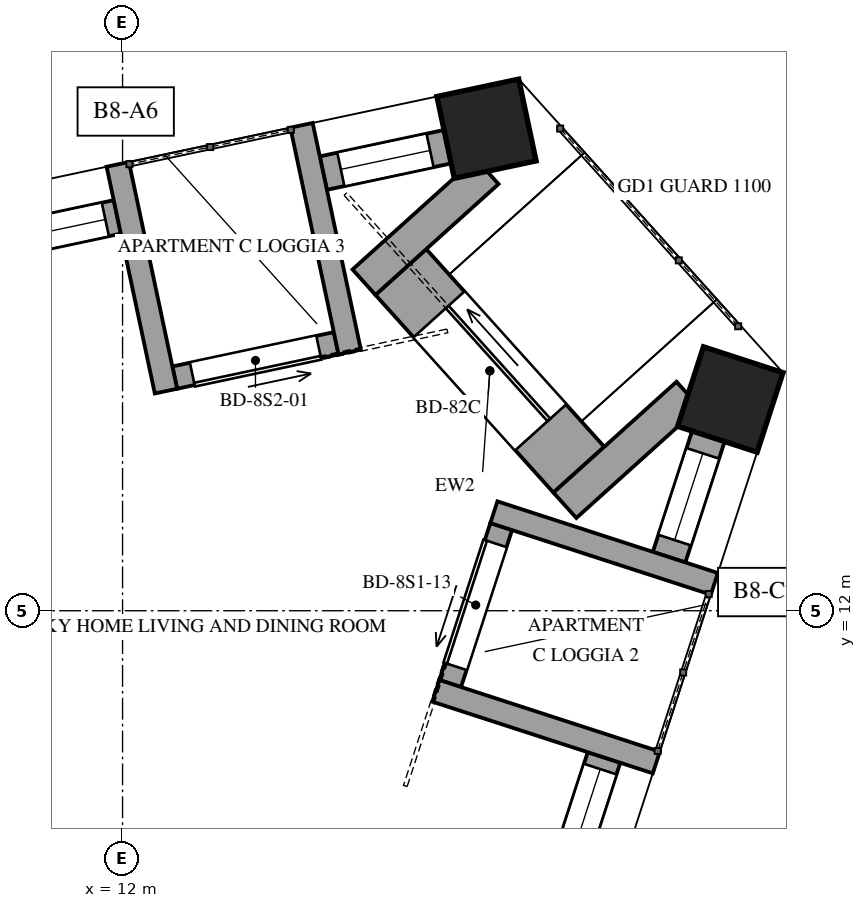
"""IFC4 building model, lengths in metres.
Left out: names, types, materials, properties, quantities, classifications, styles, units other than length and angle.
Written with IfcOpenShell. Run it as: python <this file> out.ifc"""

import sys

from ifc_helpers import new_model, si_unit, direction, frame, frame_2d, origin, origin_2d, place, context, subcontext, project, spatial, rectangle, extrude, element, fill, save


model = new_model("IFC4")
c1 = context("Model", 3, precision=1e-05, world=origin(), true_north=direction((0.0, 1.0)))
c2 = subcontext(c1, "Body", "Model", "MODEL_VIEW")
j1 = project(units=[si_unit("LENGTHUNIT", "METRE"), si_unit("PLANEANGLEUNIT", "RADIAN")], contexts=[c1])
p1 = place(None, origin())
s1 = spatial("IfcSite", under=j1, at=p1, CompositionType="ELEMENT")
p2 = place(p1, origin())
s2 = spatial("IfcBuilding", under=s1, at=p2, CompositionType="ELEMENT")
p3 = place(p2, frame((0.0, 0.0, 320.4)))
s3 = spatial("IfcBuildingStorey", under=s2, at=p3, CompositionType="ELEMENT", Elevation=320.4)
for number, where, z_axis, x_axis in (
    (1, (19.996, 14.779, -0.35), (0.0, 0.0, 1.0), (0.309, 0.951, 0.0)),
    (2, (16.788, 18.341, -0.35), (0.0, 0.0, 1.0), (-0.978, -0.208, 0.0)),
):
    element("IfcColumn", number, at=place(p3, frame(where, z_axis=z_axis, x_axis=x_axis)), inside=s3, PredefinedType="COLUMN", context=c2, shape_type="SweptSolid", body=[
        extrude(rectangle(XDim=1.1, YDim=1.1, at=origin_2d()), origin(), (0.0, 0.0, 1.0), 4.35),
    ])
p4 = place(p3, frame((17.632, 7.909, 0.0), z_axis=(0.0, 0.0, 1.0), x_axis=(0.309027740273, 0.951053024674, 0.0)))
e3 = element("IfcWall", 3, at=p4, inside=s3, PredefinedType="SOLIDWALL", context=c2, shape_type="SweptSolid", body=[
    extrude(rectangle(XDim=2.271, YDim=0.45, at=frame_2d((1.136, 0.0))), origin(), (0.0, 0.0, 1.0), 3.3),
])
p5 = place(p4, frame((0.161, 0.0, 0.4)))
e4 = element("IfcOpeningElement", 4, at=p5, cuts=e3, PredefinedType="OPENING", context=c2, shape_type="SweptSolid", body=[
    extrude(rectangle(XDim=1.95, YDim=2.75, at=frame_2d((0.975, 1.375))), frame((0.0, 0.235, 0.0), z_axis=(0.0, -1.0, 0.0), x_axis=(1.0, 0.0, 0.0)), (0.0, 0.0, 1.0), 0.47),
])
p6 = place(p3, frame((19.19, 12.705, 0.0), z_axis=(0.0, 0.0, 1.0), x_axis=(0.30898696848, 0.951066271776, 0.0)))
e5 = element("IfcWall", 5, at=p6, inside=s3, PredefinedType="SOLIDWALL", context=c2, shape_type="SweptSolid", body=[
    extrude(rectangle(XDim=1.671, YDim=0.45, at=frame_2d((0.835, 0.0))), origin(), (0.0, 0.0, 1.0), 3.3),
])
p7 = place(p6, frame((0.236, 0.0, 0.4)))
e6 = element("IfcOpeningElement", 6, at=p7, cuts=e5, PredefinedType="OPENING", context=c2, shape_type="SweptSolid", body=[
    extrude(rectangle(XDim=1.2, YDim=2.1, at=frame_2d((0.6, 1.05))), frame((0.0, 0.235, 0.0), z_axis=(0.0, -1.0, 0.0), x_axis=(1.0, 0.0, 0.0)), (0.0, 0.0, 1.0), 0.47),
])
p8 = place(p3, frame((16.276, 18.105, 0.0), z_axis=(0.0, 0.0, 1.0), x_axis=(-0.978126168783, -0.208012494676, 0.0)))
e7 = element("IfcWall", 7, at=p8, inside=s3, PredefinedType="SOLIDWALL", context=c2, shape_type="SweptSolid", body=[
    extrude(rectangle(XDim=1.671, YDim=0.45, at=frame_2d((0.836, 0.0))), origin(), (0.0, 0.0, 1.0), 3.3),
])
p9 = place(p8, frame((0.236, 0.0, 0.4)))
e8 = element("IfcOpeningElement", 8, at=p9, cuts=e7, PredefinedType="OPENING", context=c2, shape_type="SweptSolid", body=[
    extrude(rectangle(XDim=1.2, YDim=2.1, at=frame_2d((0.6, 1.05))), frame((0.0, 0.235, 0.0), z_axis=(0.0, -1.0, 0.0), x_axis=(1.0, 0.0, 0.0)), (0.0, 0.0, 1.0), 0.47),
])
p10 = place(p3, frame((11.931, 17.181, 0.0), z_axis=(0.0, 0.0, 1.0), x_axis=(-0.978153386925, -0.207884467067, 0.0)))
e9 = element("IfcWall", 9, at=p10, inside=s3, PredefinedType="SOLIDWALL", context=c2, shape_type="SweptSolid", body=[
    extrude(rectangle(XDim=2.271, YDim=0.45, at=frame_2d((1.136, 0.0))), origin(), (0.0, 0.0, 1.0), 3.3),
])
p11 = place(p10, frame((0.161, 0.0, 0.4)))
e10 = element("IfcOpeningElement", 10, at=p11, cuts=e9, PredefinedType="OPENING", context=c2, shape_type="SweptSolid", body=[
    extrude(rectangle(XDim=1.95, YDim=2.75, at=frame_2d((0.975, 1.375))), frame((0.0, 0.235, 0.0), z_axis=(0.0, -1.0, 0.0), x_axis=(1.0, 0.0, 0.0)), (0.0, 0.0, 1.0), 0.47),
])
p12 = place(p3, frame((16.311, 11.042, 0.0), z_axis=(0.0, 0.0, 1.0), x_axis=(0.308999623589, 0.95106216023, 0.0)))
e11 = element("IfcWall", 11, at=p12, inside=s3, PredefinedType="SOLIDWALL", context=c2, shape_type="SweptSolid", body=[
    extrude(rectangle(XDim=2.171, YDim=0.3, at=frame_2d((1.085, 0.0))), origin(), (0.0, 0.0, 1.0), 3.3),
])
p13 = place(p12, frame((0.236, 0.0, 0.0)))
e12 = element("IfcOpeningElement", 12, at=p13, cuts=e11, PredefinedType="OPENING", context=c2, shape_type="SweptSolid", body=[
    extrude(rectangle(XDim=1.7, YDim=2.5, at=frame_2d((0.85, 1.25))), frame((0.0, 0.16, 0.0), z_axis=(0.0, -1.0, 0.0), x_axis=(1.0, 0.0, 0.0)), (0.0, 0.0, 1.0), 0.32),
])
for number, where, z_axis, x_axis in (
    (13, (19.022, 10.003, 0.0), (0.0, 0.0, 1.0), (-0.951, 0.309, 0.0)),
    (14, (19.786, 12.354, 0.0), (0.0, 0.0, 1.0), (-0.951, 0.309, 0.0)),
):
    element("IfcWall", number, at=place(p3, frame(where, z_axis=z_axis, x_axis=x_axis)), inside=s3, PredefinedType="SOLIDWALL", context=c2, shape_type="SweptSolid", body=[
        extrude(rectangle(XDim=3.05, YDim=0.3, at=frame_2d((1.525, 0.0))), origin(), (0.0, 0.0, 1.0), 3.3),
    ])
p14 = place(p3, frame((14.811, 15.518, 0.0), z_axis=(0.0, 0.0, 1.0), x_axis=(-0.978148276005, -0.207908513891, 0.0)))
e15 = element("IfcWall", 15, at=p14, inside=s3, PredefinedType="SOLIDWALL", context=c2, shape_type="SweptSolid", body=[
    extrude(rectangle(XDim=2.171, YDim=0.3, at=frame_2d((1.085, 0.0))), origin(), (0.0, 0.0, 1.0), 3.3),
])
p15 = place(p14, frame((0.236, 0.0, 0.0)))
e16 = element("IfcOpeningElement", 16, at=p15, cuts=e15, PredefinedType="OPENING", context=c2, shape_type="SweptSolid", body=[
    extrude(rectangle(XDim=1.7, YDim=2.5, at=frame_2d((0.85, 1.25))), frame((0.0, 0.16, 0.0), z_axis=(0.0, -1.0, 0.0), x_axis=(1.0, 0.0, 0.0)), (0.0, 0.0, 1.0), 0.32),
])
p16 = place(p3, frame((14.354, 18.386, 0.0), z_axis=(0.0, 0.0, 1.0), x_axis=(0.207954487003, -0.978138503145, 0.0)))
e17 = element("IfcWall", 17, at=p16, inside=s3, PredefinedType="SOLIDWALL", context=c2, shape_type="SweptSolid", body=[
    extrude(rectangle(XDim=3.05, YDim=0.3, at=frame_2d((1.525, 0.0))), origin(), (0.0, 0.0, 1.0), 3.3),
])
p17 = place(p3, frame((11.937, 17.872, 0.0), z_axis=(0.0, 0.0, 1.0), x_axis=(0.207894179953, -0.978151322619, 0.0)))
e18 = element("IfcWall", 18, at=p17, inside=s3, PredefinedType="SOLIDWALL", context=c2, shape_type="SweptSolid", body=[
    extrude(rectangle(XDim=3.05, YDim=0.3, at=frame_2d((1.525, 0.0))), origin(), (0.0, 0.0, 1.0), 3.3),
])
p18 = place(p3, frame((15.661, 16.456, 0.0), z_axis=(0.0, 0.0, 1.0), x_axis=(0.669134277936, -0.743141519559, 0.0)))
e19 = element("IfcWall", 19, at=p18, inside=s3, PredefinedType="SOLIDWALL", context=c2, shape_type="SweptSolid", body=[
    extrude(rectangle(XDim=3.5, YDim=0.9, at=frame_2d((1.75, 0.0))), origin(), (0.0, 0.0, 1.0), 3.3),
])
p19 = place(p18, frame((0.75, 0.0, 0.0)))
e20 = element("IfcOpeningElement", 20, at=p19, cuts=e19, PredefinedType="OPENING", context=c2, shape_type="SweptSolid", body=[
    extrude(rectangle(XDim=2.0, YDim=2.4, at=frame_2d((1.0, 1.2))), frame((0.0, 0.46, 0.0), z_axis=(0.0, -1.0, 0.0), x_axis=(1.0, 0.0, 0.0)), (0.0, 0.0, 1.0), 0.92),
])
p20 = place(p3, frame((16.796, 17.781, 0.0), z_axis=(0.0, 0.0, 1.0), x_axis=(-0.743165997662, -0.669107091518, 0.0)))
e21 = element("IfcWall", 21, at=p20, inside=s3, PredefinedType="SOLIDWALL", context=c2, shape_type="SweptSolid", body=[
    extrude(rectangle(XDim=2.179, YDim=0.45, at=frame_2d((1.089, 0.0))), origin(), (0.0, 0.0, 1.0), 2.55),
])
p21 = place(p3, frame((19.439, 14.845, 0.0), z_axis=(0.0, 0.0, 1.0), x_axis=(-0.743110286166, -0.669168964159, 0.0)))
e22 = element("IfcWall", 22, at=p21, inside=s3, PredefinedType="SOLIDWALL", context=c2, shape_type="SweptSolid", body=[
    extrude(rectangle(XDim=2.179, YDim=0.45, at=frame_2d((1.09, 0.0))), origin(), (0.0, 0.0, 1.0), 2.55),
])
p22 = place(p5, origin())
e23 = element("IfcWindow", 23, at=p22, inside=s3, PartitioningType="SINGLE_PANEL", PredefinedType="WINDOW", context=c2, shape_type="SweptSolid", body=[
    extrude(rectangle(XDim=1.95, YDim=2.75, at=frame_2d((0.975, 1.375))), frame((0.0, 0.03, 0.0), z_axis=(0.0, -1.0, 0.0), x_axis=(1.0, 0.0, 0.0)), (0.0, 0.0, 1.0), 0.06),
])
fill(e4, e23)
p23 = place(p7, origin())
e24 = element("IfcWindow", 24, at=p23, inside=s3, PartitioningType="SINGLE_PANEL", PredefinedType="WINDOW", context=c2, shape_type="SweptSolid", body=[
    extrude(rectangle(XDim=1.2, YDim=2.1, at=frame_2d((0.6, 1.05))), frame((0.0, 0.03, 0.0), z_axis=(0.0, -1.0, 0.0), x_axis=(1.0, 0.0, 0.0)), (0.0, 0.0, 1.0), 0.06),
])
fill(e6, e24)
p24 = place(p9, origin())
e25 = element("IfcWindow", 25, at=p24, inside=s3, PartitioningType="SINGLE_PANEL", PredefinedType="WINDOW", context=c2, shape_type="SweptSolid", body=[
    extrude(rectangle(XDim=1.2, YDim=2.1, at=frame_2d((0.6, 1.05))), frame((0.0, 0.03, 0.0), z_axis=(0.0, -1.0, 0.0), x_axis=(1.0, 0.0, 0.0)), (0.0, 0.0, 1.0), 0.06),
])
fill(e8, e25)
p25 = place(p11, origin())
e26 = element("IfcWindow", 26, at=p25, inside=s3, PartitioningType="SINGLE_PANEL", PredefinedType="WINDOW", context=c2, shape_type="SweptSolid", body=[
    extrude(rectangle(XDim=1.95, YDim=2.75, at=frame_2d((0.975, 1.375))), frame((0.0, 0.03, 0.0), z_axis=(0.0, -1.0, 0.0), x_axis=(1.0, 0.0, 0.0)), (0.0, 0.0, 1.0), 0.06),
])
fill(e10, e26)
p26 = place(p13, origin())
e27 = element("IfcDoor", 27, at=p26, inside=s3, OperationType="SLIDING_TO_LEFT", PredefinedType="DOOR", context=c2, shape_type="SweptSolid", body=[
    extrude(rectangle(XDim=1.7, YDim=2.5, at=frame_2d((0.85, 1.25))), frame((0.0, 0.025, 0.0), z_axis=(0.0, -1.0, 0.0), x_axis=(1.0, 0.0, 0.0)), (0.0, 0.0, 1.0), 0.05),
])
fill(e12, e27)
p27 = place(p15, origin())
e28 = element("IfcDoor", 28, at=p27, inside=s3, OperationType="SLIDING_TO_LEFT", PredefinedType="DOOR", context=c2, shape_type="SweptSolid", body=[
    extrude(rectangle(XDim=1.7, YDim=2.5, at=frame_2d((0.85, 1.25))), frame((0.0, 0.025, 0.0), z_axis=(0.0, -1.0, 0.0), x_axis=(1.0, 0.0, 0.0)), (0.0, 0.0, 1.0), 0.05),
])
fill(e16, e28)
p28 = place(p19, origin())
e29 = element("IfcDoor", 29, at=p28, inside=s3, OperationType="SLIDING_TO_LEFT", PredefinedType="DOOR", context=c2, shape_type="SweptSolid", body=[
    extrude(rectangle(XDim=2.0, YDim=2.4, at=frame_2d((1.0, 1.2))), frame((0.0, 0.025, 0.0), z_axis=(0.0, -1.0, 0.0), x_axis=(1.0, 0.0, 0.0)), (0.0, 0.0, 1.0), 0.05),
])
fill(e20, e29)
save(model, sys.argv[1])
